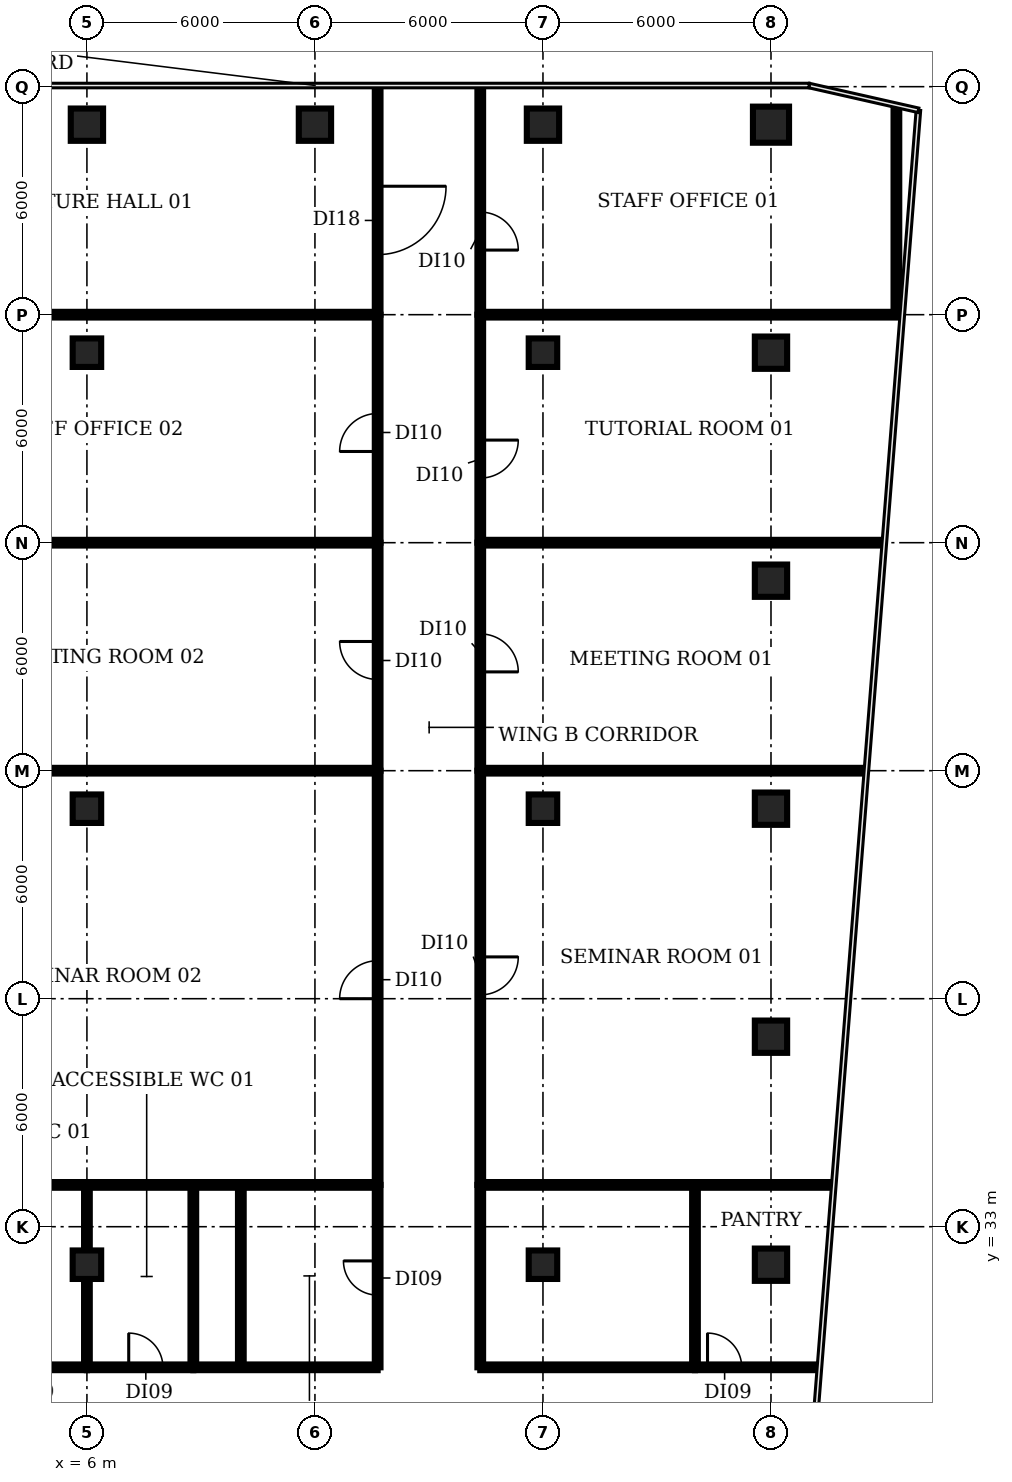
"""IFC4 building model, lengths in metres.
Left out: names, types, materials, properties, quantities, classifications, styles, units other than length and angle.
Written with IfcOpenShell. Run it as: python <this file> out.ifc"""

import sys

from ifc_helpers import new_model, si_unit, direction, frame, frame_2d, origin, origin_2d, place, context, subcontext, project, spatial, rectangle, circle, extrude, element, fill, save


model = new_model("IFC4")
c1 = context("Model", 3, precision=1e-05, world=origin(), true_north=direction((0.0, 1.0)))
c2 = subcontext(c1, "Body", "Model", "MODEL_VIEW")
j1 = project(units=[si_unit("LENGTHUNIT", "METRE"), si_unit("PLANEANGLEUNIT", "RADIAN")], contexts=[c1])
p1 = place(None, origin())
s1 = spatial("IfcSite", under=j1, at=p1, CompositionType="ELEMENT")
p2 = place(p1, origin())
s2 = spatial("IfcBuilding", under=s1, at=p2, CompositionType="ELEMENT")
p3 = place(p2, frame((0.0, 0.0, 150.8)))
s3 = spatial("IfcBuildingStorey", under=s2, at=p3, CompositionType="ELEMENT", Elevation=150.8)
for number, where, z_axis, x_axis in (
    (1, (6.0, 32.0, 0.0), (0.0, 0.0, 1.0), (1.0, 0.0, 0.0)),
    (2, (6.0, 44.0, 0.0), (0.0, 0.0, 1.0), (1.0, 0.0, 0.0)),
    (3, (6.0, 56.0, 0.0), (0.0, 0.0, 1.0), (1.0, 0.0, 0.0)),
):
    element("IfcColumn", number, at=place(p3, frame(where, z_axis=z_axis, x_axis=x_axis)), inside=s3, PredefinedType="COLUMN", context=c2, shape_type="SweptSolid", body=[
        extrude(rectangle(XDim=0.75, YDim=0.75, at=origin_2d()), origin(), (0.0, 0.0, 1.0), 3.85),
    ])
for number, where, z_axis, x_axis in (
    (4, (6.0, 62.0, 0.0), (0.0, 0.0, 1.0), (1.0, 0.0, 0.0)),
    (5, (12.0, 62.0, 0.0), (0.0, 0.0, 1.0), (1.0, 0.0, 0.0)),
):
    element("IfcColumn", number, at=place(p3, frame(where, z_axis=z_axis, x_axis=x_axis)), inside=s3, PredefinedType="COLUMN", context=c2, shape_type="SweptSolid", body=[
        extrude(rectangle(XDim=0.85, YDim=0.85, at=origin_2d()), origin(), (0.0, 0.0, 1.0), 3.85),
    ])
for number, where, z_axis, x_axis in (
    (6, (18.0, 32.0, 0.0), (0.0, 0.0, 1.0), (1.0, 0.0, 0.0)),
    (7, (18.0, 44.0, 0.0), (0.0, 0.0, 1.0), (1.0, 0.0, 0.0)),
    (8, (18.0, 56.0, 0.0), (0.0, 0.0, 1.0), (1.0, 0.0, 0.0)),
):
    element("IfcColumn", number, at=place(p3, frame(where, z_axis=z_axis, x_axis=x_axis)), inside=s3, PredefinedType="COLUMN", context=c2, shape_type="SweptSolid", body=[
        extrude(rectangle(XDim=0.75, YDim=0.75, at=origin_2d()), origin(), (0.0, 0.0, 1.0), 3.85),
    ])
for number, where, z_axis, x_axis in (
    (9, (18.0, 62.0, 0.0), (0.0, 0.0, 1.0), (1.0, 0.0, 0.0)),
    (10, (24.0, 32.0, 0.0), (0.0, 0.0, 1.0), (1.0, 0.0, 0.0)),
    (11, (24.0, 38.0, 0.0), (0.0, 0.0, 1.0), (1.0, 0.0, 0.0)),
    (12, (24.0, 44.0, 0.0), (0.0, 0.0, 1.0), (1.0, 0.0, 0.0)),
    (13, (24.0, 50.0, 0.0), (0.0, 0.0, 1.0), (1.0, 0.0, 0.0)),
    (14, (24.0, 56.0, 0.0), (0.0, 0.0, 1.0), (1.0, 0.0, 0.0)),
):
    element("IfcColumn", number, at=place(p3, frame(where, z_axis=z_axis, x_axis=x_axis)), inside=s3, PredefinedType="COLUMN", context=c2, shape_type="SweptSolid", body=[
        extrude(rectangle(XDim=0.85, YDim=0.85, at=origin_2d()), origin(), (0.0, 0.0, 1.0), 3.85),
    ])
p4 = place(p3, frame((24.0, 62.0, 0.0), z_axis=(0.0, 0.0, 1.0), x_axis=(1.0, 0.0, 0.0)))
e15 = element("IfcColumn", 15, at=p4, inside=s3, PredefinedType="COLUMN", context=c2, shape_type="SweptSolid", body=[
    extrude(circle(Radius=0.475, at=origin_2d()), origin(), (0.0, 0.0, 1.0), 3.85),
])
p5 = place(p3, frame((-0.98, 34.1, 0.0), z_axis=(0.0, 0.0, 1.0), x_axis=(1.0, 0.0, 0.0)))
e16 = element("IfcWall", 16, at=p5, inside=s3, PredefinedType="PARTITIONING", context=c2, shape_type="SweptSolid", body=[
    extrude(rectangle(XDim=14.63, YDim=0.15, at=frame_2d((7.315, 0.0))), origin(), (0.0, 0.0, 1.0), 2.88),
])
for number, where, z_axis, x_axis in (
    (17, (-0.965, 45.0, 0.0), (0.0, 0.0, 1.0), (1.0, 0.0, 0.0)),
    (18, (-0.965, 51.0, 0.0), (0.0, 0.0, 1.0), (1.0, 0.0, 0.0)),
    (19, (-0.965, 57.0, 0.0), (0.0, 0.0, 1.0), (1.0, 0.0, 0.0)),
):
    element("IfcWall", number, at=place(p3, frame(where, z_axis=z_axis, x_axis=x_axis)), inside=s3, PredefinedType="PARTITIONING", context=c2, shape_type="SweptSolid", body=[
        extrude(rectangle(XDim=14.615, YDim=0.15, at=frame_2d((7.308, 0.0))), origin(), (0.0, 0.0, 1.0), 2.88),
    ])
p6 = place(p3, frame((2.7, 29.3, 0.0), z_axis=(0.0, 0.0, 1.0), x_axis=(1.0, 0.0, 0.0)))
e20 = element("IfcWall", 20, at=p6, inside=s3, PredefinedType="PARTITIONING", context=c2, shape_type="SweptSolid", body=[
    extrude(rectangle(XDim=3.3, YDim=0.15, at=frame_2d((1.65, 0.0))), origin(), (0.0, 0.0, 1.0), 2.88),
])
p7 = place(p6, frame((1.3, 0.0, 0.0)))
e21 = element("IfcOpeningElement", 21, at=p7, cuts=e20, PredefinedType="OPENING", context=c2, shape_type="SweptSolid", body=[
    extrude(rectangle(XDim=0.9, YDim=2.1, at=frame_2d((0.45, 1.05))), frame((0.0, 0.085, 0.0), z_axis=(0.0, -1.0, 0.0), x_axis=(1.0, 0.0, 0.0)), (0.0, 0.0, 1.0), 0.17),
])
p8 = place(p3, frame((6.0, 29.3, 0.0), z_axis=(0.0, 0.0, 1.0), x_axis=(0.0, 1.0, 0.0)))
e22 = element("IfcWall", 22, at=p8, inside=s3, PredefinedType="PARTITIONING", context=c2, shape_type="SweptSolid", body=[
    extrude(rectangle(XDim=4.8, YDim=0.15, at=frame_2d((2.4, 0.0))), origin(), (0.0, 0.0, 1.0), 2.88),
])
p9 = place(p3, frame((6.0, 29.3, 0.0), z_axis=(0.0, 0.0, 1.0), x_axis=(1.0, 0.0, 0.0)))
e23 = element("IfcWall", 23, at=p9, inside=s3, PredefinedType="PARTITIONING", context=c2, shape_type="SweptSolid", body=[
    extrude(rectangle(XDim=2.8, YDim=0.15, at=frame_2d((1.4, 0.0))), origin(), (0.0, 0.0, 1.0), 2.88),
])
p10 = place(p9, frame((1.1, 0.0, 0.0)))
e24 = element("IfcOpeningElement", 24, at=p10, cuts=e23, PredefinedType="OPENING", context=c2, shape_type="SweptSolid", body=[
    extrude(rectangle(XDim=0.9, YDim=2.1, at=frame_2d((0.45, 1.05))), frame((0.0, 0.085, 0.0), z_axis=(0.0, -1.0, 0.0), x_axis=(1.0, 0.0, 0.0)), (0.0, 0.0, 1.0), 0.17),
])
p11 = place(p3, frame((8.8, 29.3, 0.0), z_axis=(0.0, 0.0, 1.0), x_axis=(0.0, 1.0, 0.0)))
e25 = element("IfcWall", 25, at=p11, inside=s3, PredefinedType="PARTITIONING", context=c2, shape_type="SweptSolid", body=[
    extrude(rectangle(XDim=4.8, YDim=0.15, at=frame_2d((2.4, 0.0))), origin(), (0.0, 0.0, 1.0), 2.88),
])
p12 = place(p3, frame((8.8, 29.3, 0.0), z_axis=(0.0, 0.0, 1.0), x_axis=(1.0, 0.0, 0.0)))
e26 = element("IfcWall", 26, at=p12, inside=s3, PredefinedType="PARTITIONING", context=c2, shape_type="SweptSolid", body=[
    extrude(rectangle(XDim=4.85, YDim=0.15, at=frame_2d((2.425, 0.0))), origin(), (0.0, 0.0, 1.0), 2.88),
])
p13 = place(p3, frame((10.05, 29.3, 0.0), z_axis=(0.0, 0.0, 1.0), x_axis=(0.0, 1.0, 0.0)))
e27 = element("IfcWall", 27, at=p13, inside=s3, PredefinedType="PARTITIONING", context=c2, shape_type="SweptSolid", body=[
    extrude(rectangle(XDim=4.8, YDim=0.15, at=frame_2d((2.4, 0.0))), origin(), (0.0, 0.0, 1.0), 2.88),
])
p14 = place(p3, frame((13.65, 29.3, 0.0), z_axis=(0.0, 0.0, 1.0), x_axis=(0.0, 1.0, 0.0)))
e28 = element("IfcWall", 28, at=p14, inside=s3, PredefinedType="PARTITIONING", context=c2, shape_type="SweptSolid", body=[
    extrude(rectangle(XDim=4.8, YDim=0.15, at=frame_2d((2.4, 0.0))), origin(), (0.0, 0.0, 1.0), 2.88),
])
p15 = place(p14, frame((1.9, 0.0, 0.0)))
e29 = element("IfcOpeningElement", 29, at=p15, cuts=e28, PredefinedType="OPENING", context=c2, shape_type="SweptSolid", body=[
    extrude(rectangle(XDim=0.9, YDim=2.1, at=frame_2d((0.45, 1.05))), frame((0.0, 0.085, 0.0), z_axis=(0.0, -1.0, 0.0), x_axis=(1.0, 0.0, 0.0)), (0.0, 0.0, 1.0), 0.17),
])
p16 = place(p3, frame((13.65, 34.1, 0.0), z_axis=(0.0, 0.0, 1.0), x_axis=(0.0, 1.0, 0.0)))
e30 = element("IfcWall", 30, at=p16, inside=s3, PredefinedType="PARTITIONING", context=c2, shape_type="SweptSolid", body=[
    extrude(rectangle(XDim=10.9, YDim=0.15, at=frame_2d((5.45, 0.0))), origin(), (0.0, 0.0, 1.0), 2.88),
])
p17 = place(p16, frame((4.9, 0.0, 0.0)))
e31 = element("IfcOpeningElement", 31, at=p17, cuts=e30, PredefinedType="OPENING", context=c2, shape_type="SweptSolid", body=[
    extrude(rectangle(XDim=1.0, YDim=2.1, at=frame_2d((0.5, 1.05))), frame((0.0, 0.085, 0.0), z_axis=(0.0, -1.0, 0.0), x_axis=(1.0, 0.0, 0.0)), (0.0, 0.0, 1.0), 0.17),
])
p18 = place(p3, frame((13.65, 45.0, 0.0), z_axis=(0.0, 0.0, 1.0), x_axis=(0.0, 1.0, 0.0)))
e32 = element("IfcWall", 32, at=p18, inside=s3, PredefinedType="PARTITIONING", context=c2, shape_type="SweptSolid", body=[
    extrude(rectangle(XDim=6.0, YDim=0.15, at=frame_2d((3.0, 0.0))), origin(), (0.0, 0.0, 1.0), 2.88),
])
p19 = place(p18, frame((2.4, 0.0, 0.0)))
e33 = element("IfcOpeningElement", 33, at=p19, cuts=e32, PredefinedType="OPENING", context=c2, shape_type="SweptSolid", body=[
    extrude(rectangle(XDim=1.0, YDim=2.1, at=frame_2d((0.5, 1.05))), frame((0.0, 0.085, 0.0), z_axis=(0.0, -1.0, 0.0), x_axis=(1.0, 0.0, 0.0)), (0.0, 0.0, 1.0), 0.17),
])
p20 = place(p3, frame((13.65, 51.0, 0.0), z_axis=(0.0, 0.0, 1.0), x_axis=(0.0, 1.0, 0.0)))
e34 = element("IfcWall", 34, at=p20, inside=s3, PredefinedType="PARTITIONING", context=c2, shape_type="SweptSolid", body=[
    extrude(rectangle(XDim=6.0, YDim=0.15, at=frame_2d((3.0, 0.0))), origin(), (0.0, 0.0, 1.0), 2.88),
])
p21 = place(p20, frame((2.4, 0.0, 0.0)))
e35 = element("IfcOpeningElement", 35, at=p21, cuts=e34, PredefinedType="OPENING", context=c2, shape_type="SweptSolid", body=[
    extrude(rectangle(XDim=1.0, YDim=2.1, at=frame_2d((0.5, 1.05))), frame((0.0, 0.085, 0.0), z_axis=(0.0, -1.0, 0.0), x_axis=(1.0, 0.0, 0.0)), (0.0, 0.0, 1.0), 0.17),
])
p22 = place(p3, frame((13.65, 62.98, 0.0), z_axis=(0.0, 0.0, 1.0), x_axis=(0.0, -1.0, 0.0)))
e36 = element("IfcWall", 36, at=p22, inside=s3, PredefinedType="PARTITIONING", context=c2, shape_type="SweptSolid", body=[
    extrude(rectangle(XDim=5.98, YDim=0.15, at=frame_2d((2.99, 0.0))), origin(), (0.0, 0.0, 1.0), 2.88),
])
p23 = place(p22, frame((2.6, 0.0, 0.0)))
e37 = element("IfcOpeningElement", 37, at=p23, cuts=e36, PredefinedType="OPENING", context=c2, shape_type="SweptSolid", body=[
    extrude(rectangle(XDim=1.8, YDim=2.1, at=frame_2d((0.9, 1.05))), frame((0.0, 0.085, 0.0), z_axis=(0.0, -1.0, 0.0), x_axis=(1.0, 0.0, 0.0)), (0.0, 0.0, 1.0), 0.17),
])
p24 = place(p3, frame((16.35, 29.3, 0.0), z_axis=(0.0, 0.0, 1.0), x_axis=(0.0, 1.0, 0.0)))
e38 = element("IfcWall", 38, at=p24, inside=s3, PredefinedType="PARTITIONING", context=c2, shape_type="SweptSolid", body=[
    extrude(rectangle(XDim=4.8, YDim=0.15, at=frame_2d((2.4, 0.0))), origin(), (0.0, 0.0, 1.0), 2.88),
])
p25 = place(p3, frame((16.35, 29.3, 0.0), z_axis=(0.0, 0.0, 1.0), x_axis=(1.0, 0.0, 0.0)))
e39 = element("IfcWall", 39, at=p25, inside=s3, PredefinedType="PARTITIONING", context=c2, shape_type="SweptSolid", body=[
    extrude(rectangle(XDim=5.65, YDim=0.15, at=frame_2d((2.825, 0.0))), origin(), (0.0, 0.0, 1.0), 2.88),
])
p26 = place(p3, frame((16.35, 34.1, 0.0), z_axis=(0.0, 0.0, 1.0), x_axis=(1.0, 0.0, 0.0)))
e40 = element("IfcWall", 40, at=p26, inside=s3, PredefinedType="PARTITIONING", context=c2, shape_type="SweptSolid", body=[
    extrude(rectangle(XDim=9.25, YDim=0.15, at=frame_2d((4.625, 0.0))), origin(), (0.0, 0.0, 1.0), 2.88),
])
p27 = place(p3, frame((16.35, 45.0, 0.0), z_axis=(0.0, 0.0, 1.0), x_axis=(0.0, -1.0, 0.0)))
e41 = element("IfcWall", 41, at=p27, inside=s3, PredefinedType="PARTITIONING", context=c2, shape_type="SweptSolid", body=[
    extrude(rectangle(XDim=10.9, YDim=0.15, at=frame_2d((5.45, 0.0))), origin(), (0.0, 0.0, 1.0), 2.88),
])
p28 = place(p27, frame((4.9, 0.0, 0.0)))
e42 = element("IfcOpeningElement", 42, at=p28, cuts=e41, PredefinedType="OPENING", context=c2, shape_type="SweptSolid", body=[
    extrude(rectangle(XDim=1.0, YDim=2.1, at=frame_2d((0.5, 1.05))), frame((0.0, 0.085, 0.0), z_axis=(0.0, -1.0, 0.0), x_axis=(1.0, 0.0, 0.0)), (0.0, 0.0, 1.0), 0.17),
])
p29 = place(p3, frame((16.35, 45.0, 0.0), z_axis=(0.0, 0.0, 1.0), x_axis=(1.0, 0.0, 0.0)))
e43 = element("IfcWall", 43, at=p29, inside=s3, PredefinedType="PARTITIONING", context=c2, shape_type="SweptSolid", body=[
    extrude(rectangle(XDim=10.11, YDim=0.15, at=frame_2d((5.055, 0.0))), origin(), (0.0, 0.0, 1.0), 2.88),
])
p30 = place(p3, frame((16.35, 51.0, 0.0), z_axis=(0.0, 0.0, 1.0), x_axis=(0.0, -1.0, 0.0)))
e44 = element("IfcWall", 44, at=p30, inside=s3, PredefinedType="PARTITIONING", context=c2, shape_type="SweptSolid", body=[
    extrude(rectangle(XDim=6.0, YDim=0.15, at=frame_2d((3.0, 0.0))), origin(), (0.0, 0.0, 1.0), 2.88),
])
p31 = place(p30, frame((2.4, 0.0, 0.0)))
e45 = element("IfcOpeningElement", 45, at=p31, cuts=e44, PredefinedType="OPENING", context=c2, shape_type="SweptSolid", body=[
    extrude(rectangle(XDim=1.0, YDim=2.1, at=frame_2d((0.5, 1.05))), frame((0.0, 0.085, 0.0), z_axis=(0.0, -1.0, 0.0), x_axis=(1.0, 0.0, 0.0)), (0.0, 0.0, 1.0), 0.17),
])
p32 = place(p3, frame((16.35, 51.0, 0.0), z_axis=(0.0, 0.0, 1.0), x_axis=(1.0, 0.0, 0.0)))
e46 = element("IfcWall", 46, at=p32, inside=s3, PredefinedType="PARTITIONING", context=c2, shape_type="SweptSolid", body=[
    extrude(rectangle(XDim=10.58, YDim=0.15, at=frame_2d((5.29, 0.0))), origin(), (0.0, 0.0, 1.0), 2.88),
])
p33 = place(p3, frame((16.35, 57.0, 0.0), z_axis=(0.0, 0.0, 1.0), x_axis=(0.0, -1.0, 0.0)))
e47 = element("IfcWall", 47, at=p33, inside=s3, PredefinedType="PARTITIONING", context=c2, shape_type="SweptSolid", body=[
    extrude(rectangle(XDim=6.0, YDim=0.15, at=frame_2d((3.0, 0.0))), origin(), (0.0, 0.0, 1.0), 2.88),
])
p34 = place(p33, frame((3.3, 0.0, 0.0)))
e48 = element("IfcOpeningElement", 48, at=p34, cuts=e47, PredefinedType="OPENING", context=c2, shape_type="SweptSolid", body=[
    extrude(rectangle(XDim=1.0, YDim=2.1, at=frame_2d((0.5, 1.05))), frame((0.0, 0.085, 0.0), z_axis=(0.0, -1.0, 0.0), x_axis=(1.0, 0.0, 0.0)), (0.0, 0.0, 1.0), 0.17),
])
p35 = place(p3, frame((16.35, 57.0, 0.0), z_axis=(0.0, 0.0, 1.0), x_axis=(1.0, 0.0, 0.0)))
e49 = element("IfcWall", 49, at=p35, inside=s3, PredefinedType="PARTITIONING", context=c2, shape_type="SweptSolid", body=[
    extrude(rectangle(XDim=11.045, YDim=0.15, at=frame_2d((5.522, 0.0))), origin(), (0.0, 0.0, 1.0), 2.88),
])
p36 = place(p3, frame((16.35, 62.98, 0.0), z_axis=(0.0, 0.0, 1.0), x_axis=(0.0, -1.0, 0.0)))
e50 = element("IfcWall", 50, at=p36, inside=s3, PredefinedType="PARTITIONING", context=c2, shape_type="SweptSolid", body=[
    extrude(rectangle(XDim=5.98, YDim=0.15, at=frame_2d((2.99, 0.0))), origin(), (0.0, 0.0, 1.0), 2.88),
])
p37 = place(p36, frame((3.28, 0.0, 0.0)))
e51 = element("IfcOpeningElement", 51, at=p37, cuts=e50, PredefinedType="OPENING", context=c2, shape_type="SweptSolid", body=[
    extrude(rectangle(XDim=1.0, YDim=2.1, at=frame_2d((0.5, 1.05))), frame((0.0, 0.085, 0.0), z_axis=(0.0, -1.0, 0.0), x_axis=(1.0, 0.0, 0.0)), (0.0, 0.0, 1.0), 0.17),
])
p38 = place(p3, frame((22.0, 29.3, 0.0), z_axis=(0.0, 0.0, 1.0), x_axis=(0.0, 1.0, 0.0)))
e52 = element("IfcWall", 52, at=p38, inside=s3, PredefinedType="PARTITIONING", context=c2, shape_type="SweptSolid", body=[
    extrude(rectangle(XDim=4.8, YDim=0.15, at=frame_2d((2.4, 0.0))), origin(), (0.0, 0.0, 1.0), 2.88),
])
p39 = place(p3, frame((22.0, 29.3, 0.0), z_axis=(0.0, 0.0, 1.0), x_axis=(1.0, 0.0, 0.0)))
e53 = element("IfcWall", 53, at=p39, inside=s3, PredefinedType="PARTITIONING", context=c2, shape_type="SweptSolid", body=[
    extrude(rectangle(XDim=3.23, YDim=0.15, at=frame_2d((1.615, 0.0))), origin(), (0.0, 0.0, 1.0), 2.88),
])
p40 = place(p39, frame((0.33, 0.0, 0.0)))
e54 = element("IfcOpeningElement", 54, at=p40, cuts=e53, PredefinedType="OPENING", context=c2, shape_type="SweptSolid", body=[
    extrude(rectangle(XDim=0.9, YDim=2.1, at=frame_2d((0.45, 1.05))), frame((0.0, 0.085, 0.0), z_axis=(0.0, -1.0, 0.0), x_axis=(1.0, 0.0, 0.0)), (0.0, 0.0, 1.0), 0.17),
])
p41 = place(p3, frame((27.3, 57.0, 0.0), z_axis=(0.0, 0.0, 1.0), x_axis=(0.0, 1.0, 0.0)))
e55 = element("IfcWall", 55, at=p41, inside=s3, PredefinedType="PARTITIONING", context=c2, shape_type="SweptSolid", body=[
    extrude(rectangle(XDim=5.46, YDim=0.15, at=frame_2d((2.73, 0.0))), origin(), (0.0, 0.0, 1.0), 2.88),
])
p42 = place(p10, origin())
e56 = element("IfcDoor", 56, at=p42, inside=s3, OperationType="SINGLE_SWING_LEFT", PredefinedType="DOOR", context=c2, shape_type="SweptSolid", body=[
    extrude(rectangle(XDim=0.9, YDim=2.1, at=frame_2d((0.45, 1.05))), frame((0.0, 0.025, 0.0), z_axis=(0.0, -1.0, 0.0), x_axis=(1.0, 0.0, 0.0)), (0.0, 0.0, 1.0), 0.05),
])
fill(e24, e56)
p43 = place(p15, origin())
e57 = element("IfcDoor", 57, at=p43, inside=s3, OperationType="SINGLE_SWING_RIGHT", PredefinedType="DOOR", context=c2, shape_type="SweptSolid", body=[
    extrude(rectangle(XDim=0.9, YDim=2.1, at=frame_2d((0.45, 1.05))), frame((0.0, 0.025, 0.0), z_axis=(0.0, -1.0, 0.0), x_axis=(1.0, 0.0, 0.0)), (0.0, 0.0, 1.0), 0.05),
])
fill(e29, e57)
p44 = place(p17, origin())
e58 = element("IfcDoor", 58, at=p44, inside=s3, OperationType="SINGLE_SWING_LEFT", PredefinedType="DOOR", context=c2, shape_type="SweptSolid", body=[
    extrude(rectangle(XDim=1.0, YDim=2.1, at=frame_2d((0.5, 1.05))), frame((0.0, 0.025, 0.0), z_axis=(0.0, -1.0, 0.0), x_axis=(1.0, 0.0, 0.0)), (0.0, 0.0, 1.0), 0.05),
])
fill(e31, e58)
p45 = place(p19, origin())
e59 = element("IfcDoor", 59, at=p45, inside=s3, OperationType="SINGLE_SWING_RIGHT", PredefinedType="DOOR", context=c2, shape_type="SweptSolid", body=[
    extrude(rectangle(XDim=1.0, YDim=2.1, at=frame_2d((0.5, 1.05))), frame((0.0, 0.025, 0.0), z_axis=(0.0, -1.0, 0.0), x_axis=(1.0, 0.0, 0.0)), (0.0, 0.0, 1.0), 0.05),
])
fill(e33, e59)
p46 = place(p21, origin())
e60 = element("IfcDoor", 60, at=p46, inside=s3, OperationType="SINGLE_SWING_LEFT", PredefinedType="DOOR", context=c2, shape_type="SweptSolid", body=[
    extrude(rectangle(XDim=1.0, YDim=2.1, at=frame_2d((0.5, 1.05))), frame((0.0, 0.025, 0.0), z_axis=(0.0, -1.0, 0.0), x_axis=(1.0, 0.0, 0.0)), (0.0, 0.0, 1.0), 0.05),
])
fill(e35, e60)
p47 = place(p23, origin())
e61 = element("IfcDoor", 61, at=p47, inside=s3, OperationType="SINGLE_SWING_LEFT", PredefinedType="DOOR", context=c2, shape_type="SweptSolid", body=[
    extrude(rectangle(XDim=1.8, YDim=2.1, at=frame_2d((0.9, 1.05))), frame((0.0, 0.025, 0.0), z_axis=(0.0, -1.0, 0.0), x_axis=(1.0, 0.0, 0.0)), (0.0, 0.0, 1.0), 0.05),
])
fill(e37, e61)
p48 = place(p28, origin())
e62 = element("IfcDoor", 62, at=p48, inside=s3, OperationType="SINGLE_SWING_LEFT", PredefinedType="DOOR", context=c2, shape_type="SweptSolid", body=[
    extrude(rectangle(XDim=1.0, YDim=2.1, at=frame_2d((0.5, 1.05))), frame((0.0, 0.025, 0.0), z_axis=(0.0, -1.0, 0.0), x_axis=(1.0, 0.0, 0.0)), (0.0, 0.0, 1.0), 0.05),
])
fill(e42, e62)
p49 = place(p31, origin())
e63 = element("IfcDoor", 63, at=p49, inside=s3, OperationType="SINGLE_SWING_RIGHT", PredefinedType="DOOR", context=c2, shape_type="SweptSolid", body=[
    extrude(rectangle(XDim=1.0, YDim=2.1, at=frame_2d((0.5, 1.05))), frame((0.0, 0.025, 0.0), z_axis=(0.0, -1.0, 0.0), x_axis=(1.0, 0.0, 0.0)), (0.0, 0.0, 1.0), 0.05),
])
fill(e45, e63)
p50 = place(p34, origin())
e64 = element("IfcDoor", 64, at=p50, inside=s3, OperationType="SINGLE_SWING_LEFT", PredefinedType="DOOR", context=c2, shape_type="SweptSolid", body=[
    extrude(rectangle(XDim=1.0, YDim=2.1, at=frame_2d((0.5, 1.05))), frame((0.0, 0.025, 0.0), z_axis=(0.0, -1.0, 0.0), x_axis=(1.0, 0.0, 0.0)), (0.0, 0.0, 1.0), 0.05),
])
fill(e48, e64)
p51 = place(p37, origin())
e65 = element("IfcDoor", 65, at=p51, inside=s3, OperationType="SINGLE_SWING_RIGHT", PredefinedType="DOOR", context=c2, shape_type="SweptSolid", body=[
    extrude(rectangle(XDim=1.0, YDim=2.1, at=frame_2d((0.5, 1.05))), frame((0.0, 0.025, 0.0), z_axis=(0.0, -1.0, 0.0), x_axis=(1.0, 0.0, 0.0)), (0.0, 0.0, 1.0), 0.05),
])
fill(e51, e65)
p52 = place(p40, origin())
e66 = element("IfcDoor", 66, at=p52, inside=s3, OperationType="SINGLE_SWING_LEFT", PredefinedType="DOOR", context=c2, shape_type="SweptSolid", body=[
    extrude(rectangle(XDim=0.9, YDim=2.1, at=frame_2d((0.45, 1.05))), frame((0.0, 0.025, 0.0), z_axis=(0.0, -1.0, 0.0), x_axis=(1.0, 0.0, 0.0)), (0.0, 0.0, 1.0), 0.05),
])
fill(e54, e66)
save(model, sys.argv[1])
